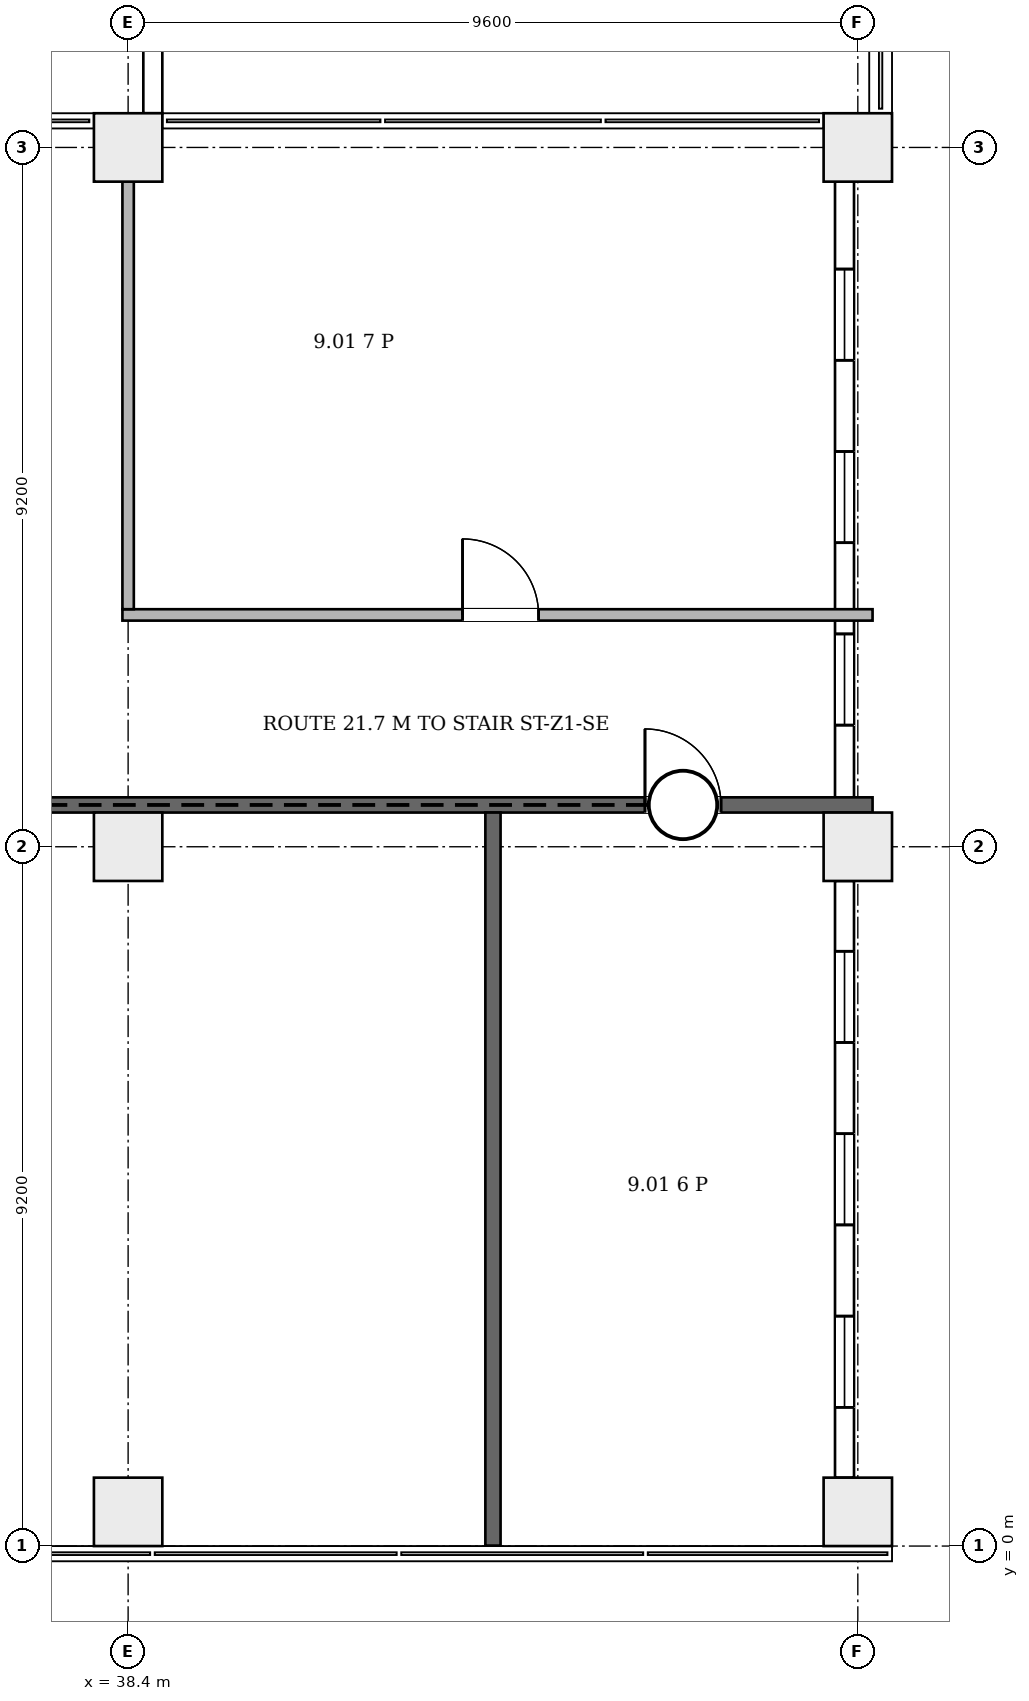
"""IFC4 building model, lengths in metres.
Left out: names, types, materials, properties, quantities, classifications, styles, units other than length and angle.
Written with IfcOpenShell. Run it as: python <this file> out.ifc"""

import sys

from ifc_helpers import new_model, si_unit, direction, frame, frame_2d, origin, origin_2d, place, context, subcontext, project, spatial, rectangle, extrude, element, fill, save


model = new_model("IFC4")
c1 = context("Model", 3, precision=1e-05, world=origin(), true_north=direction((0.0, 1.0)))
c2 = subcontext(c1, "Body", "Model", "MODEL_VIEW")
j1 = project(units=[si_unit("LENGTHUNIT", "METRE"), si_unit("PLANEANGLEUNIT", "RADIAN")], contexts=[c1])
p1 = place(None, origin())
s1 = spatial("IfcSite", under=j1, at=p1, CompositionType="ELEMENT")
p2 = place(p1, origin())
s2 = spatial("IfcBuilding", under=s1, at=p2, CompositionType="ELEMENT")
p3 = place(p2, frame((0.0, 0.0, 48.7)))
s3 = spatial("IfcBuildingStorey", under=s2, at=p3, CompositionType="ELEMENT", Elevation=48.7)
for number, where, z_axis, x_axis in (
    (1, (38.4, 0.45, 0.0), (0.0, 0.0, 1.0), (1.0, 0.0, 0.0)),
    (2, (48.0, 0.45, 0.0), (0.0, 0.0, 1.0), (1.0, 0.0, 0.0)),
    (3, (38.4, 9.2, 0.0), (0.0, 0.0, 1.0), (1.0, 0.0, 0.0)),
    (4, (48.0, 9.2, 0.0), (0.0, 0.0, 1.0), (1.0, 0.0, 0.0)),
    (5, (38.4, 18.4, 0.0), (0.0, 0.0, 1.0), (1.0, 0.0, 0.0)),
    (6, (48.0, 18.4, 0.0), (0.0, 0.0, 1.0), (1.0, 0.0, 0.0)),
):
    element("IfcColumn", number, at=place(p3, frame(where, z_axis=z_axis, x_axis=x_axis)), inside=s3, PredefinedType="COLUMN", context=c2, shape_type="SweptSolid", body=[
        extrude(rectangle(XDim=0.9, YDim=0.9, at=origin_2d()), origin(), (0.0, 0.0, 1.0), 4.2),
    ])
p4 = place(p3, frame((47.825, 0.9, 0.0), z_axis=(0.0, 0.0, 1.0), x_axis=(0.0, 1.0, 0.0)))
e7 = element("IfcWall", 7, at=p4, inside=s3, PredefinedType="ELEMENTEDWALL", context=c2, shape_type="SweptSolid", body=[
    extrude(rectangle(XDim=7.85, YDim=0.25, at=frame_2d((3.925, 0.0))), origin(), (0.0, 0.0, 1.0), 3.3),
])
p5 = place(p4, frame((0.925, 0.0, 0.6)))
e8 = element("IfcOpeningElement", 8, at=p5, cuts=e7, PredefinedType="OPENING", context=c2, shape_type="SweptSolid", body=[
    extrude(rectangle(XDim=1.2, YDim=2.6, at=frame_2d((0.6, 1.3))), frame((0.0, 0.135, 0.0), z_axis=(0.0, -1.0, 0.0), x_axis=(1.0, 0.0, 0.0)), (0.0, 0.0, 1.0), 0.27),
])
p6 = place(p4, frame((3.325, 0.0, 0.6)))
e9 = element("IfcOpeningElement", 9, at=p6, cuts=e7, PredefinedType="OPENING", context=c2, shape_type="SweptSolid", body=[
    extrude(rectangle(XDim=1.2, YDim=2.6, at=frame_2d((0.6, 1.3))), frame((0.0, 0.135, 0.0), z_axis=(0.0, -1.0, 0.0), x_axis=(1.0, 0.0, 0.0)), (0.0, 0.0, 1.0), 0.27),
])
p7 = place(p4, frame((5.725, 0.0, 0.6)))
e10 = element("IfcOpeningElement", 10, at=p7, cuts=e7, PredefinedType="OPENING", context=c2, shape_type="SweptSolid", body=[
    extrude(rectangle(XDim=1.2, YDim=2.6, at=frame_2d((0.6, 1.3))), frame((0.0, 0.135, 0.0), z_axis=(0.0, -1.0, 0.0), x_axis=(1.0, 0.0, 0.0)), (0.0, 0.0, 1.0), 0.27),
])
p8 = place(p3, frame((47.825, 9.65, 0.0), z_axis=(0.0, 0.0, 1.0), x_axis=(0.0, 1.0, 0.0)))
e11 = element("IfcWall", 11, at=p8, inside=s3, PredefinedType="ELEMENTEDWALL", context=c2, shape_type="SweptSolid", body=[
    extrude(rectangle(XDim=8.3, YDim=0.25, at=frame_2d((4.15, 0.0))), origin(), (0.0, 0.0, 1.0), 3.3),
])
p9 = place(p8, frame((1.15, 0.0, 0.6)))
e12 = element("IfcOpeningElement", 12, at=p9, cuts=e11, PredefinedType="OPENING", context=c2, shape_type="SweptSolid", body=[
    extrude(rectangle(XDim=1.2, YDim=2.6, at=frame_2d((0.6, 1.3))), frame((0.0, 0.135, 0.0), z_axis=(0.0, -1.0, 0.0), x_axis=(1.0, 0.0, 0.0)), (0.0, 0.0, 1.0), 0.27),
])
p10 = place(p8, frame((3.55, 0.0, 0.6)))
e13 = element("IfcOpeningElement", 13, at=p10, cuts=e11, PredefinedType="OPENING", context=c2, shape_type="SweptSolid", body=[
    extrude(rectangle(XDim=1.2, YDim=2.6, at=frame_2d((0.6, 1.3))), frame((0.0, 0.135, 0.0), z_axis=(0.0, -1.0, 0.0), x_axis=(1.0, 0.0, 0.0)), (0.0, 0.0, 1.0), 0.27),
])
p11 = place(p8, frame((5.95, 0.0, 0.6)))
e14 = element("IfcOpeningElement", 14, at=p11, cuts=e11, PredefinedType="OPENING", context=c2, shape_type="SweptSolid", body=[
    extrude(rectangle(XDim=1.2, YDim=2.6, at=frame_2d((0.6, 1.3))), frame((0.0, 0.135, 0.0), z_axis=(0.0, -1.0, 0.0), x_axis=(1.0, 0.0, 0.0)), (0.0, 0.0, 1.0), 0.27),
])
p12 = place(p3, frame((38.725, 18.85, 4.2), z_axis=(0.0, 0.0, 1.0), x_axis=(0.0, 1.0, 0.0)))
e15 = element("IfcWall", 15, at=p12, inside=s3, PredefinedType="PARAPET", context=c2, shape_type="SweptSolid", body=[
    extrude(rectangle(XDim=8.3, YDim=0.25, at=frame_2d((4.15, 0.0))), origin(), (0.0, 0.0, 1.0), 1.1),
])
p13 = place(p3, frame((4.3, 9.75, 0.0), z_axis=(0.0, 0.0, 1.0), x_axis=(1.0, 0.0, 0.0)))
e16 = element("IfcWall", 16, at=p13, inside=s3, PredefinedType="PARTITIONING", context=c2, shape_type="SweptSolid", body=[
    extrude(rectangle(XDim=43.894, YDim=0.2, at=frame_2d((21.947, 0.0))), origin(), (0.0, 0.0, 1.0), 3.9),
])
p14 = place(p13, frame((7.0, 0.0, 0.0)))
e17 = element("IfcOpeningElement", 17, at=p14, cuts=e16, PredefinedType="OPENING", context=c2, shape_type="SweptSolid", body=[
    extrude(rectangle(XDim=1.0, YDim=2.1, at=frame_2d((0.5, 1.05))), frame((0.0, 0.11, 0.0), z_axis=(0.0, -1.0, 0.0), x_axis=(1.0, 0.0, 0.0)), (0.0, 0.0, 1.0), 0.22),
])
p15 = place(p13, frame((19.2, 0.0, 0.0)))
e18 = element("IfcOpeningElement", 18, at=p15, cuts=e16, PredefinedType="OPENING", context=c2, shape_type="SweptSolid", body=[
    extrude(rectangle(XDim=1.0, YDim=2.1, at=frame_2d((0.5, 1.05))), frame((0.0, 0.11, 0.0), z_axis=(0.0, -1.0, 0.0), x_axis=(1.0, 0.0, 0.0)), (0.0, 0.0, 1.0), 0.22),
])
p16 = place(p13, frame((30.95, 0.0, 0.0)))
e19 = element("IfcOpeningElement", 19, at=p16, cuts=e16, PredefinedType="OPENING", context=c2, shape_type="SweptSolid", body=[
    extrude(rectangle(XDim=1.5, YDim=2.1, at=frame_2d((0.75, 1.05))), frame((0.0, 0.11, 0.0), z_axis=(0.0, -1.0, 0.0), x_axis=(1.0, 0.0, 0.0)), (0.0, 0.0, 1.0), 0.22),
])
p17 = place(p13, frame((40.9, 0.0, 0.0)))
e20 = element("IfcOpeningElement", 20, at=p17, cuts=e16, PredefinedType="OPENING", context=c2, shape_type="SweptSolid", body=[
    extrude(rectangle(XDim=1.0, YDim=2.1, at=frame_2d((0.5, 1.05))), frame((0.0, 0.11, 0.0), z_axis=(0.0, -1.0, 0.0), x_axis=(1.0, 0.0, 0.0)), (0.0, 0.0, 1.0), 0.22),
])
p18 = place(p3, frame((38.325, 12.25, 0.0), z_axis=(0.0, 0.0, 1.0), x_axis=(1.0, 0.0, 0.0)))
e21 = element("IfcWall", 21, at=p18, inside=s3, PredefinedType="PARTITIONING", context=c2, shape_type="SweptSolid", body=[
    extrude(rectangle(XDim=9.869, YDim=0.15, at=frame_2d((4.935, 0.0))), origin(), (0.0, 0.0, 1.0), 3.9),
])
p19 = place(p18, frame((4.475, 0.0, 0.0)))
e22 = element("IfcOpeningElement", 22, at=p19, cuts=e21, PredefinedType="OPENING", context=c2, shape_type="SweptSolid", body=[
    extrude(rectangle(XDim=1.0, YDim=2.1, at=frame_2d((0.5, 1.05))), frame((0.0, 0.085, 0.0), z_axis=(0.0, -1.0, 0.0), x_axis=(1.0, 0.0, 0.0)), (0.0, 0.0, 1.0), 0.17),
])
p20 = place(p3, frame((38.4, 12.325, 0.0), z_axis=(0.0, 0.0, 1.0), x_axis=(0.0, 1.0, 0.0)))
e23 = element("IfcWall", 23, at=p20, inside=s3, PredefinedType="PARTITIONING", context=c2, shape_type="SweptSolid", body=[
    extrude(rectangle(XDim=5.625, YDim=0.15, at=frame_2d((2.812, 0.0))), origin(), (0.0, 0.0, 1.0), 3.9),
])
p21 = place(p3, frame((43.2, 0.006, 0.0), z_axis=(0.0, 0.0, 1.0), x_axis=(0.0, 1.0, 0.0)))
e24 = element("IfcWall", 24, at=p21, inside=s3, PredefinedType="PARTITIONING", context=c2, shape_type="SweptSolid", body=[
    extrude(rectangle(XDim=9.644, YDim=0.2, at=frame_2d((4.822, 0.0))), origin(), (0.0, 0.0, 1.0), 3.9),
])
p22 = place(p5, origin())
e25 = element("IfcWindow", 25, at=p22, inside=s3, PartitioningType="SINGLE_PANEL", PredefinedType="WINDOW", context=c2, shape_type="SweptSolid", body=[
    extrude(rectangle(XDim=1.2, YDim=2.6, at=frame_2d((0.6, 1.3))), frame((0.0, 0.03, 0.0), z_axis=(0.0, -1.0, 0.0), x_axis=(1.0, 0.0, 0.0)), (0.0, 0.0, 1.0), 0.06),
])
fill(e8, e25)
p23 = place(p6, origin())
e26 = element("IfcWindow", 26, at=p23, inside=s3, PartitioningType="SINGLE_PANEL", PredefinedType="WINDOW", context=c2, shape_type="SweptSolid", body=[
    extrude(rectangle(XDim=1.2, YDim=2.6, at=frame_2d((0.6, 1.3))), frame((0.0, 0.03, 0.0), z_axis=(0.0, -1.0, 0.0), x_axis=(1.0, 0.0, 0.0)), (0.0, 0.0, 1.0), 0.06),
])
fill(e9, e26)
p24 = place(p7, origin())
e27 = element("IfcWindow", 27, at=p24, inside=s3, PartitioningType="SINGLE_PANEL", PredefinedType="WINDOW", context=c2, shape_type="SweptSolid", body=[
    extrude(rectangle(XDim=1.2, YDim=2.6, at=frame_2d((0.6, 1.3))), frame((0.0, 0.03, 0.0), z_axis=(0.0, -1.0, 0.0), x_axis=(1.0, 0.0, 0.0)), (0.0, 0.0, 1.0), 0.06),
])
fill(e10, e27)
p25 = place(p9, origin())
e28 = element("IfcWindow", 28, at=p25, inside=s3, PartitioningType="SINGLE_PANEL", PredefinedType="WINDOW", context=c2, shape_type="SweptSolid", body=[
    extrude(rectangle(XDim=1.2, YDim=2.6, at=frame_2d((0.6, 1.3))), frame((0.0, 0.03, 0.0), z_axis=(0.0, -1.0, 0.0), x_axis=(1.0, 0.0, 0.0)), (0.0, 0.0, 1.0), 0.06),
])
fill(e12, e28)
p26 = place(p10, origin())
e29 = element("IfcWindow", 29, at=p26, inside=s3, PartitioningType="SINGLE_PANEL", PredefinedType="WINDOW", context=c2, shape_type="SweptSolid", body=[
    extrude(rectangle(XDim=1.2, YDim=2.6, at=frame_2d((0.6, 1.3))), frame((0.0, 0.03, 0.0), z_axis=(0.0, -1.0, 0.0), x_axis=(1.0, 0.0, 0.0)), (0.0, 0.0, 1.0), 0.06),
])
fill(e13, e29)
p27 = place(p11, origin())
e30 = element("IfcWindow", 30, at=p27, inside=s3, PartitioningType="SINGLE_PANEL", PredefinedType="WINDOW", context=c2, shape_type="SweptSolid", body=[
    extrude(rectangle(XDim=1.2, YDim=2.6, at=frame_2d((0.6, 1.3))), frame((0.0, 0.03, 0.0), z_axis=(0.0, -1.0, 0.0), x_axis=(1.0, 0.0, 0.0)), (0.0, 0.0, 1.0), 0.06),
])
fill(e14, e30)
p28 = place(p17, origin())
e31 = element("IfcDoor", 31, at=p28, inside=s3, OperationType="SINGLE_SWING_LEFT", PredefinedType="DOOR", context=c2, shape_type="SweptSolid", body=[
    extrude(rectangle(XDim=1.0, YDim=2.1, at=frame_2d((0.5, 1.05))), frame((0.0, 0.025, 0.0), z_axis=(0.0, -1.0, 0.0), x_axis=(1.0, 0.0, 0.0)), (0.0, 0.0, 1.0), 0.05),
])
fill(e20, e31)
p29 = place(p19, origin())
e32 = element("IfcDoor", 32, at=p29, inside=s3, OperationType="SINGLE_SWING_RIGHT", PredefinedType="DOOR", context=c2, shape_type="SweptSolid", body=[
    extrude(rectangle(XDim=1.0, YDim=2.1, at=frame_2d((0.5, 1.05))), frame((0.0, 0.025, 0.0), z_axis=(0.0, -1.0, 0.0), x_axis=(1.0, 0.0, 0.0)), (0.0, 0.0, 1.0), 0.05),
])
fill(e22, e32)
save(model, sys.argv[1])
